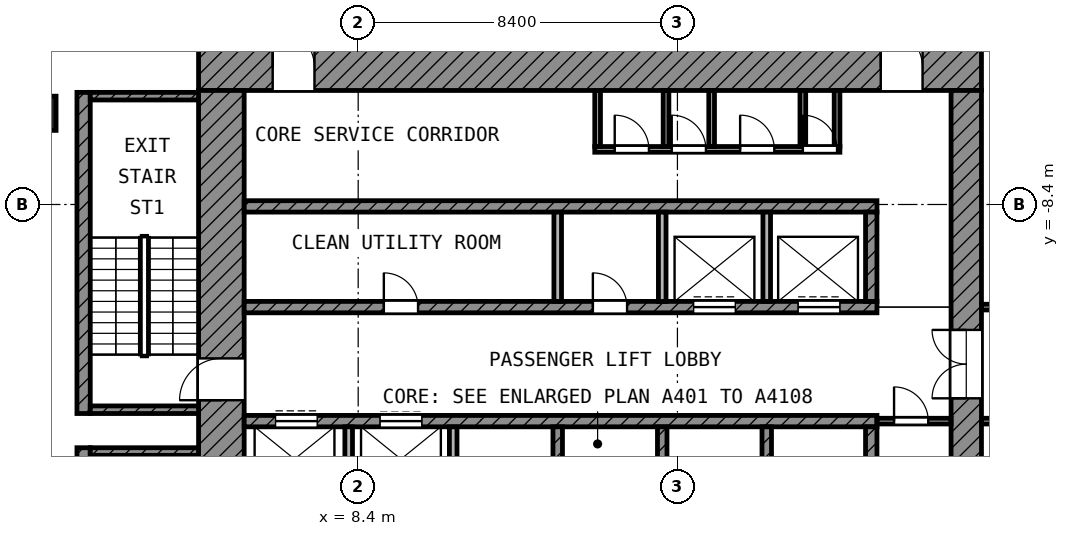
"""IFC4 building model, lengths in metres.
Left out: names, types, materials, properties, quantities, classifications, styles, units other than length and angle.
Written with IfcOpenShell. Run it as: python <this file> out.ifc"""

import sys

from ifc_helpers import new_model, si_unit, direction, frame, frame_2d, origin, origin_2d, place, context, subcontext, project, spatial, rectangle, extrude, element, fill, save


model = new_model("IFC4")
c1 = context("Model", 3, precision=1e-05, world=origin(), true_north=direction((0.0, 1.0)))
c2 = subcontext(c1, "Body", "Model", "MODEL_VIEW")
j1 = project(units=[si_unit("LENGTHUNIT", "METRE"), si_unit("PLANEANGLEUNIT", "RADIAN")], contexts=[c1])
p1 = place(None, origin())
s1 = spatial("IfcSite", under=j1, at=p1, CompositionType="ELEMENT")
p2 = place(p1, origin())
s2 = spatial("IfcBuilding", under=s1, at=p2, CompositionType="ELEMENT")
p3 = place(p2, frame((0.0, 0.0, 255.8)))
s3 = spatial("IfcBuildingStorey", under=s2, at=p3, CompositionType="ELEMENT", Elevation=255.8)
p4 = place(p3, frame((0.0, -6.0, 0.0), z_axis=(0.0, 0.0, 1.0), x_axis=(1.0, 0.0, 0.0)))
e1 = element("IfcColumn", 1, at=p4, inside=s3, PredefinedType="COLUMN", context=c2, shape_type="SweptSolid", body=[
    extrude(rectangle(XDim=0.9, YDim=0.9, at=origin_2d()), origin(), (0.0, 0.0, 1.0), 4.2),
])
p5 = place(p3, frame((4.2, -4.8, 0.0), z_axis=(0.0, 0.0, 1.0), x_axis=(1.0, 0.0, 0.0)))
e2 = element("IfcWall", 2, at=p5, inside=s3, PredefinedType="SHEAR", context=c2, shape_type="SweptSolid", body=[
    extrude(rectangle(XDim=20.6, YDim=1.2, at=frame_2d((10.3, 0.0))), origin(), (0.0, 0.0, 1.0), 3.6),
])
p6 = place(p5, frame((1.95, 0.0, 0.0)))
e3 = element("IfcOpeningElement", 3, at=p6, cuts=e2, PredefinedType="OPENING", context=c2, shape_type="SweptSolid", body=[
    extrude(rectangle(XDim=1.1, YDim=2.1, at=frame_2d((0.55, 1.05))), frame((0.0, 0.61, 0.0), z_axis=(0.0, -1.0, 0.0), x_axis=(1.0, 0.0, 0.0)), (0.0, 0.0, 1.0), 1.22),
])
p7 = place(p5, frame((17.95, 0.0, 0.0)))
e4 = element("IfcOpeningElement", 4, at=p7, cuts=e2, PredefinedType="OPENING", context=c2, shape_type="SweptSolid", body=[
    extrude(rectangle(XDim=1.1, YDim=2.1, at=frame_2d((0.55, 1.05))), frame((0.0, 0.61, 0.0), z_axis=(0.0, -1.0, 0.0), x_axis=(1.0, 0.0, 0.0)), (0.0, 0.0, 1.0), 1.22),
])
p8 = place(p3, frame((4.8, -24.8, 0.0), z_axis=(0.0, 0.0, 1.0), x_axis=(0.0, 1.0, 0.0)))
e5 = element("IfcWall", 5, at=p8, inside=s3, PredefinedType="SHEAR", context=c2, shape_type="SweptSolid", body=[
    extrude(rectangle(XDim=19.4, YDim=1.2, at=frame_2d((9.7, 0.0))), origin(), (0.0, 0.0, 1.0), 3.6),
])
p9 = place(p8, frame((11.25, 0.0, 0.0)))
e6 = element("IfcOpeningElement", 6, at=p9, cuts=e5, PredefinedType="OPENING", context=c2, shape_type="SweptSolid", body=[
    extrude(rectangle(XDim=1.1, YDim=2.1, at=frame_2d((0.55, 1.05))), frame((0.0, 0.61, 0.0), z_axis=(0.0, -1.0, 0.0), x_axis=(1.0, 0.0, 0.0)), (0.0, 0.0, 1.0), 1.22),
])
p10 = place(p8, frame((1.95, 0.0, 0.0)))
e7 = element("IfcOpeningElement", 7, at=p10, cuts=e5, PredefinedType="OPENING", context=c2, shape_type="SweptSolid", body=[
    extrude(rectangle(XDim=1.1, YDim=2.1, at=frame_2d((0.55, 1.05))), frame((0.0, 0.61, 0.0), z_axis=(0.0, -1.0, 0.0), x_axis=(1.0, 0.0, 0.0)), (0.0, 0.0, 1.0), 1.22),
])
p11 = place(p3, frame((24.4, -24.0, 0.0), z_axis=(0.0, 0.0, 1.0), x_axis=(0.0, 1.0, 0.0)))
e8 = element("IfcWall", 8, at=p11, inside=s3, PredefinedType="SHEAR", context=c2, shape_type="SweptSolid", body=[
    extrude(rectangle(XDim=18.6, YDim=0.8, at=frame_2d((9.3, 0.0))), origin(), (0.0, 0.0, 1.0), 3.6),
])
p12 = place(p11, frame((10.5, 0.0, 0.0)))
e9 = element("IfcOpeningElement", 9, at=p12, cuts=e8, PredefinedType="OPENING", context=c2, shape_type="SweptSolid", body=[
    extrude(rectangle(XDim=1.8, YDim=2.1, at=frame_2d((0.9, 1.05))), frame((0.0, 0.41, 0.0), z_axis=(0.0, -1.0, 0.0), x_axis=(1.0, 0.0, 0.0)), (0.0, 0.0, 1.0), 0.82),
])
p13 = place(p3, frame((5.4, -8.45, 0.0), z_axis=(0.0, 0.0, 1.0), x_axis=(1.0, 0.0, 0.0)))
e10 = element("IfcWall", 10, at=p13, inside=s3, PredefinedType="SHEAR", context=c2, shape_type="SweptSolid", body=[
    extrude(rectangle(XDim=16.65, YDim=0.3, at=frame_2d((8.325, 0.0))), origin(), (0.0, 0.0, 1.0), 3.6),
])
p14 = place(p3, frame((5.4, -11.1, 0.0), z_axis=(0.0, 0.0, 1.0), x_axis=(1.0, 0.0, 0.0)))
e11 = element("IfcWall", 11, at=p14, inside=s3, PredefinedType="SHEAR", context=c2, shape_type="SweptSolid", body=[
    extrude(rectangle(XDim=16.65, YDim=0.3, at=frame_2d((8.325, 0.0))), origin(), (0.0, 0.0, 1.0), 3.6),
])
p15 = place(p14, frame((11.825, 0.0, 0.0)))
e12 = element("IfcOpeningElement", 12, at=p15, cuts=e11, PredefinedType="OPENING", context=c2, shape_type="SweptSolid", body=[
    extrude(rectangle(XDim=1.1, YDim=2.1, at=frame_2d((0.55, 1.05))), frame((0.0, 0.16, 0.0), z_axis=(0.0, -1.0, 0.0), x_axis=(1.0, 0.0, 0.0)), (0.0, 0.0, 1.0), 0.32),
])
p16 = place(p14, frame((14.575, 0.0, 0.0)))
e13 = element("IfcOpeningElement", 13, at=p16, cuts=e11, PredefinedType="OPENING", context=c2, shape_type="SweptSolid", body=[
    extrude(rectangle(XDim=1.1, YDim=2.1, at=frame_2d((0.55, 1.05))), frame((0.0, 0.16, 0.0), z_axis=(0.0, -1.0, 0.0), x_axis=(1.0, 0.0, 0.0)), (0.0, 0.0, 1.0), 0.32),
])
p17 = place(p14, frame((3.675, 0.0, 0.0)))
e14 = element("IfcOpeningElement", 14, at=p17, cuts=e11, PredefinedType="OPENING", context=c2, shape_type="SweptSolid", body=[
    extrude(rectangle(XDim=0.9, YDim=2.1, at=frame_2d((0.45, 1.05))), frame((0.0, 0.16, 0.0), z_axis=(0.0, -1.0, 0.0), x_axis=(1.0, 0.0, 0.0)), (0.0, 0.0, 1.0), 0.32),
])
p18 = place(p14, frame((9.175, 0.0, 0.0)))
e15 = element("IfcOpeningElement", 15, at=p18, cuts=e11, PredefinedType="OPENING", context=c2, shape_type="SweptSolid", body=[
    extrude(rectangle(XDim=0.9, YDim=2.1, at=frame_2d((0.45, 1.05))), frame((0.0, 0.16, 0.0), z_axis=(0.0, -1.0, 0.0), x_axis=(1.0, 0.0, 0.0)), (0.0, 0.0, 1.0), 0.32),
])
p19 = place(p3, frame((5.4, -14.1, 0.0), z_axis=(0.0, 0.0, 1.0), x_axis=(1.0, 0.0, 0.0)))
e16 = element("IfcWall", 16, at=p19, inside=s3, PredefinedType="SHEAR", context=c2, shape_type="SweptSolid", body=[
    extrude(rectangle(XDim=16.65, YDim=0.3, at=frame_2d((8.325, 0.0))), origin(), (0.0, 0.0, 1.0), 3.6),
])
p20 = place(p19, frame((0.825, 0.0, 0.0)))
e17 = element("IfcOpeningElement", 17, at=p20, cuts=e16, PredefinedType="OPENING", context=c2, shape_type="SweptSolid", body=[
    extrude(rectangle(XDim=1.1, YDim=2.1, at=frame_2d((0.55, 1.05))), frame((0.0, 0.16, 0.0), z_axis=(0.0, -1.0, 0.0), x_axis=(1.0, 0.0, 0.0)), (0.0, 0.0, 1.0), 0.32),
])
p21 = place(p19, frame((3.575, 0.0, 0.0)))
e18 = element("IfcOpeningElement", 18, at=p21, cuts=e16, PredefinedType="OPENING", context=c2, shape_type="SweptSolid", body=[
    extrude(rectangle(XDim=1.1, YDim=2.1, at=frame_2d((0.55, 1.05))), frame((0.0, 0.16, 0.0), z_axis=(0.0, -1.0, 0.0), x_axis=(1.0, 0.0, 0.0)), (0.0, 0.0, 1.0), 0.32),
])
p22 = place(p3, frame((21.9, -10.95, 0.0), z_axis=(0.0, 0.0, 1.0), x_axis=(0.0, 1.0, 0.0)))
e19 = element("IfcWall", 19, at=p22, inside=s3, PredefinedType="SHEAR", context=c2, shape_type="SweptSolid", body=[
    extrude(rectangle(XDim=2.35, YDim=0.3, at=frame_2d((1.175, 0.0))), origin(), (0.0, 0.0, 1.0), 3.6),
])
p23 = place(p3, frame((21.9, -16.6, 0.0), z_axis=(0.0, 0.0, 1.0), x_axis=(0.0, 1.0, 0.0)))
e20 = element("IfcWall", 20, at=p23, inside=s3, PredefinedType="SHEAR", context=c2, shape_type="SweptSolid", body=[
    extrude(rectangle(XDim=2.35, YDim=0.3, at=frame_2d((1.175, 0.0))), origin(), (0.0, 0.0, 1.0), 3.6),
])
for number, where, z_axis, x_axis in (
    (21, (13.65, -10.95, 0.0), (0.0, 0.0, 1.0), (0.0, 1.0, 0.0)),
    (22, (16.4, -10.95, 0.0), (0.0, 0.0, 1.0), (0.0, 1.0, 0.0)),
    (23, (19.15, -10.95, 0.0), (0.0, 0.0, 1.0), (0.0, 1.0, 0.0)),
):
    element("IfcWall", number, at=place(p3, frame(where, z_axis=z_axis, x_axis=x_axis)), inside=s3, PredefinedType="PARTITIONING", context=c2, shape_type="SweptSolid", body=[
        extrude(rectangle(XDim=2.35, YDim=0.2, at=frame_2d((1.175, 0.0))), origin(), (0.0, 0.0, 1.0), 3.6),
    ])
for number, where, z_axis, x_axis in (
    (24, (8.15, -16.6, 0.0), (0.0, 0.0, 1.0), (0.0, 1.0, 0.0)),
    (25, (10.9, -16.6, 0.0), (0.0, 0.0, 1.0), (0.0, 1.0, 0.0)),
):
    element("IfcWall", number, at=place(p3, frame(where, z_axis=z_axis, x_axis=x_axis)), inside=s3, PredefinedType="PARTITIONING", context=c2, shape_type="SweptSolid", body=[
        extrude(rectangle(XDim=2.35, YDim=0.2, at=frame_2d((1.175, 0.0))), origin(), (0.0, 0.0, 1.0), 3.6),
    ])
for number, where, z_axis, x_axis in (
    (26, (13.65, -16.6, 0.0), (0.0, 0.0, 1.0), (0.0, 1.0, 0.0)),
    (27, (16.4, -16.6, 0.0), (0.0, 0.0, 1.0), (0.0, 1.0, 0.0)),
    (28, (19.15, -16.6, 0.0), (0.0, 0.0, 1.0), (0.0, 1.0, 0.0)),
):
    element("IfcWall", number, at=place(p3, frame(where, z_axis=z_axis, x_axis=x_axis)), inside=s3, PredefinedType="SHEAR", context=c2, shape_type="SweptSolid", body=[
        extrude(rectangle(XDim=2.35, YDim=0.25, at=frame_2d((1.175, 0.0))), origin(), (0.0, 0.0, 1.0), 3.6),
    ])
p24 = place(p3, frame((22.05, -14.1, 0.0), z_axis=(0.0, 0.0, 1.0), x_axis=(1.0, 0.0, 0.0)))
e29 = element("IfcWall", 29, at=p24, inside=s3, PredefinedType="PARTITIONING", context=c2, shape_type="SweptSolid", body=[
    extrude(rectangle(XDim=1.95, YDim=0.15, at=frame_2d((0.975, 0.0))), origin(), (0.0, 0.0, 1.0), 3.6),
])
p25 = place(p24, frame((0.45, 0.0, 0.0)))
e30 = element("IfcOpeningElement", 30, at=p25, cuts=e29, PredefinedType="OPENING", context=c2, shape_type="SweptSolid", body=[
    extrude(rectangle(XDim=0.9, YDim=2.1, at=frame_2d((0.45, 1.05))), frame((0.0, 0.085, 0.0), z_axis=(0.0, -1.0, 0.0), x_axis=(1.0, 0.0, 0.0)), (0.0, 0.0, 1.0), 0.17),
])
p26 = place(p3, frame((14.625, -6.95, 0.0), z_axis=(0.0, 0.0, 1.0), x_axis=(1.0, 0.0, 0.0)))
e31 = element("IfcWall", 31, at=p26, inside=s3, PredefinedType="PARTITIONING", context=c2, shape_type="SweptSolid", body=[
    extrude(rectangle(XDim=6.45, YDim=0.15, at=frame_2d((3.225, 0.0))), origin(), (0.0, 0.0, 1.0), 3.6),
])
p27 = place(p26, frame((0.525, 0.0, 0.0)))
e32 = element("IfcOpeningElement", 32, at=p27, cuts=e31, PredefinedType="OPENING", context=c2, shape_type="SweptSolid", body=[
    extrude(rectangle(XDim=0.9, YDim=2.1, at=frame_2d((0.45, 1.05))), frame((0.0, 0.085, 0.0), z_axis=(0.0, -1.0, 0.0), x_axis=(1.0, 0.0, 0.0)), (0.0, 0.0, 1.0), 0.17),
])
p28 = place(p26, frame((2.025, 0.0, 0.0)))
e33 = element("IfcOpeningElement", 33, at=p28, cuts=e31, PredefinedType="OPENING", context=c2, shape_type="SweptSolid", body=[
    extrude(rectangle(XDim=0.9, YDim=2.1, at=frame_2d((0.45, 1.05))), frame((0.0, 0.085, 0.0), z_axis=(0.0, -1.0, 0.0), x_axis=(1.0, 0.0, 0.0)), (0.0, 0.0, 1.0), 0.17),
])
p29 = place(p26, frame((3.825, 0.0, 0.0)))
e34 = element("IfcOpeningElement", 34, at=p29, cuts=e31, PredefinedType="OPENING", context=c2, shape_type="SweptSolid", body=[
    extrude(rectangle(XDim=0.9, YDim=2.1, at=frame_2d((0.45, 1.05))), frame((0.0, 0.085, 0.0), z_axis=(0.0, -1.0, 0.0), x_axis=(1.0, 0.0, 0.0)), (0.0, 0.0, 1.0), 0.17),
])
p30 = place(p26, frame((5.475, 0.0, 0.0)))
e35 = element("IfcOpeningElement", 35, at=p30, cuts=e31, PredefinedType="OPENING", context=c2, shape_type="SweptSolid", body=[
    extrude(rectangle(XDim=0.9, YDim=2.1, at=frame_2d((0.45, 1.05))), frame((0.0, 0.085, 0.0), z_axis=(0.0, -1.0, 0.0), x_axis=(1.0, 0.0, 0.0)), (0.0, 0.0, 1.0), 0.17),
])
for number, where, z_axis, x_axis in (
    (36, (14.7, -6.875, 0.0), (0.0, 0.0, 1.0), (0.0, 1.0, 0.0)),
    (37, (16.5, -6.875, 0.0), (0.0, 0.0, 1.0), (0.0, 1.0, 0.0)),
    (38, (17.7, -6.875, 0.0), (0.0, 0.0, 1.0), (0.0, 1.0, 0.0)),
    (39, (20.1, -6.875, 0.0), (0.0, 0.0, 1.0), (0.0, 1.0, 0.0)),
    (40, (21.0, -6.875, 0.0), (0.0, 0.0, 1.0), (0.0, 1.0, 0.0)),
):
    element("IfcWall", number, at=place(p3, frame(where, z_axis=z_axis, x_axis=x_axis)), inside=s3, PredefinedType="PARTITIONING", context=c2, shape_type="SweptSolid", body=[
        extrude(rectangle(XDim=1.475, YDim=0.15, at=frame_2d((0.738, 0.0))), origin(), (0.0, 0.0, 1.0), 3.6),
    ])
p31 = place(p3, frame((1.175, -13.9, 0.0), z_axis=(0.0, 0.0, 1.0), x_axis=(0.0, 1.0, 0.0)))
e41 = element("IfcWall", 41, at=p31, inside=s3, PredefinedType="SHEAR", context=c2, shape_type="SweptSolid", body=[
    extrude(rectangle(XDim=8.45, YDim=0.35, at=frame_2d((4.225, 0.0))), origin(), (0.0, 0.0, 1.0), 3.6),
])
for number, where, z_axis, x_axis in (
    (42, (1.35, -5.55, 0.0), (0.0, 0.0, 1.0), (1.0, 0.0, 0.0)),
    (43, (1.35, -13.8, 0.0), (0.0, 0.0, 1.0), (1.0, 0.0, 0.0)),
):
    element("IfcWall", number, at=place(p3, frame(where, z_axis=z_axis, x_axis=x_axis)), inside=s3, PredefinedType="SHEAR", context=c2, shape_type="SweptSolid", body=[
        extrude(rectangle(XDim=2.85, YDim=0.2, at=frame_2d((1.425, 0.0))), origin(), (0.0, 0.0, 1.0), 3.6),
    ])
p32 = place(p3, frame((1.175, -23.25, 0.0), z_axis=(0.0, 0.0, 1.0), x_axis=(0.0, 1.0, 0.0)))
e44 = element("IfcWall", 44, at=p32, inside=s3, PredefinedType="SHEAR", context=c2, shape_type="SweptSolid", body=[
    extrude(rectangle(XDim=8.45, YDim=0.35, at=frame_2d((4.225, 0.0))), origin(), (0.0, 0.0, 1.0), 3.6),
])
p33 = place(p3, frame((1.35, -14.9, 0.0), z_axis=(0.0, 0.0, 1.0), x_axis=(1.0, 0.0, 0.0)))
e45 = element("IfcWall", 45, at=p33, inside=s3, PredefinedType="SHEAR", context=c2, shape_type="SweptSolid", body=[
    extrude(rectangle(XDim=2.85, YDim=0.2, at=frame_2d((1.425, 0.0))), origin(), (0.0, 0.0, 1.0), 3.6),
])
p34 = place(p3, frame((24.8, -14.1, 0.0), z_axis=(0.0, 0.0, 1.0), x_axis=(1.0, 0.0, 0.0)))
e46 = element("IfcWall", 46, at=p34, inside=s3, PredefinedType="PARTITIONING", context=c2, shape_type="SweptSolid", body=[
    extrude(rectangle(XDim=4.525, YDim=0.15, at=frame_2d((2.262, 0.0))), origin(), (0.0, 0.0, 1.0), 3.6),
])
p35 = place(p34, frame((1.75, 0.0, 0.0)))
e47 = element("IfcOpeningElement", 47, at=p35, cuts=e46, PredefinedType="OPENING", context=c2, shape_type="SweptSolid", body=[
    extrude(rectangle(XDim=1.5, YDim=2.1, at=frame_2d((0.75, 1.05))), frame((0.0, 0.085, 0.0), z_axis=(0.0, -1.0, 0.0), x_axis=(1.0, 0.0, 0.0)), (0.0, 0.0, 1.0), 0.17),
])
p36 = place(p3, frame((24.8, -11.1, 0.0), z_axis=(0.0, 0.0, 1.0), x_axis=(1.0, 0.0, 0.0)))
e48 = element("IfcWall", 48, at=p36, inside=s3, PredefinedType="PARTITIONING", context=c2, shape_type="SweptSolid", body=[
    extrude(rectangle(XDim=4.525, YDim=0.15, at=frame_2d((2.262, 0.0))), origin(), (0.0, 0.0, 1.0), 3.6),
])
p37 = place(p36, frame((1.0, 0.0, 0.0)))
e49 = element("IfcOpeningElement", 49, at=p37, cuts=e48, PredefinedType="OPENING", context=c2, shape_type="SweptSolid", body=[
    extrude(rectangle(XDim=0.9, YDim=2.1, at=frame_2d((0.45, 1.05))), frame((0.0, 0.085, 0.0), z_axis=(0.0, -1.0, 0.0), x_axis=(1.0, 0.0, 0.0)), (0.0, 0.0, 1.0), 0.17),
])
p38 = place(p36, frame((3.05, 0.0, 0.0)))
e50 = element("IfcOpeningElement", 50, at=p38, cuts=e48, PredefinedType="OPENING", context=c2, shape_type="SweptSolid", body=[
    extrude(rectangle(XDim=1.0, YDim=2.1, at=frame_2d((0.5, 1.05))), frame((0.0, 0.085, 0.0), z_axis=(0.0, -1.0, 0.0), x_axis=(1.0, 0.0, 0.0)), (0.0, 0.0, 1.0), 0.17),
])
p39 = place(p15, origin())
e51 = element("IfcDoor", 51, at=p39, inside=s3, OperationType="DOUBLE_DOOR_SLIDING", PredefinedType="DOOR", context=c2, shape_type="SweptSolid", body=[
    extrude(rectangle(XDim=1.1, YDim=2.1, at=frame_2d((0.55, 1.05))), frame((0.0, 0.025, 0.0), z_axis=(0.0, -1.0, 0.0), x_axis=(1.0, 0.0, 0.0)), (0.0, 0.0, 1.0), 0.05),
])
fill(e12, e51)
p40 = place(p16, origin())
e52 = element("IfcDoor", 52, at=p40, inside=s3, OperationType="DOUBLE_DOOR_SLIDING", PredefinedType="DOOR", context=c2, shape_type="SweptSolid", body=[
    extrude(rectangle(XDim=1.1, YDim=2.1, at=frame_2d((0.55, 1.05))), frame((0.0, 0.025, 0.0), z_axis=(0.0, -1.0, 0.0), x_axis=(1.0, 0.0, 0.0)), (0.0, 0.0, 1.0), 0.05),
])
fill(e13, e52)
p41 = place(p20, origin())
e53 = element("IfcDoor", 53, at=p41, inside=s3, OperationType="DOUBLE_DOOR_SLIDING", PredefinedType="DOOR", context=c2, shape_type="SweptSolid", body=[
    extrude(rectangle(XDim=1.1, YDim=2.1, at=frame_2d((0.55, 1.05))), frame((0.0, 0.025, 0.0), z_axis=(0.0, -1.0, 0.0), x_axis=(1.0, 0.0, 0.0)), (0.0, 0.0, 1.0), 0.05),
])
fill(e17, e53)
p42 = place(p21, origin())
e54 = element("IfcDoor", 54, at=p42, inside=s3, OperationType="DOUBLE_DOOR_SLIDING", PredefinedType="DOOR", context=c2, shape_type="SweptSolid", body=[
    extrude(rectangle(XDim=1.1, YDim=2.1, at=frame_2d((0.55, 1.05))), frame((0.0, 0.025, 0.0), z_axis=(0.0, -1.0, 0.0), x_axis=(1.0, 0.0, 0.0)), (0.0, 0.0, 1.0), 0.05),
])
fill(e18, e54)
p43 = place(p9, origin())
e55 = element("IfcDoor", 55, at=p43, inside=s3, OperationType="SINGLE_SWING_LEFT", PredefinedType="DOOR", context=c2, shape_type="SweptSolid", body=[
    extrude(rectangle(XDim=1.1, YDim=2.1, at=frame_2d((0.55, 1.05))), frame((0.0, 0.025, 0.0), z_axis=(0.0, -1.0, 0.0), x_axis=(1.0, 0.0, 0.0)), (0.0, 0.0, 1.0), 0.05),
])
fill(e6, e55)
p44 = place(p6, origin())
e56 = element("IfcDoor", 56, at=p44, inside=s3, OperationType="SINGLE_SWING_LEFT", PredefinedType="DOOR", context=c2, shape_type="SweptSolid", body=[
    extrude(rectangle(XDim=1.1, YDim=2.1, at=frame_2d((0.55, 1.05))), frame((0.0, 0.025, 0.0), z_axis=(0.0, -1.0, 0.0), x_axis=(1.0, 0.0, 0.0)), (0.0, 0.0, 1.0), 0.05),
])
fill(e3, e56)
p45 = place(p7, origin())
e57 = element("IfcDoor", 57, at=p45, inside=s3, OperationType="SINGLE_SWING_LEFT", PredefinedType="DOOR", context=c2, shape_type="SweptSolid", body=[
    extrude(rectangle(XDim=1.1, YDim=2.1, at=frame_2d((0.55, 1.05))), frame((0.0, 0.025, 0.0), z_axis=(0.0, -1.0, 0.0), x_axis=(1.0, 0.0, 0.0)), (0.0, 0.0, 1.0), 0.05),
])
fill(e4, e57)
p46 = place(p12, origin())
e58 = element("IfcDoor", 58, at=p46, inside=s3, OperationType="DOUBLE_DOOR_SINGLE_SWING", PredefinedType="DOOR", context=c2, shape_type="SweptSolid", body=[
    extrude(rectangle(XDim=1.8, YDim=2.1, at=frame_2d((0.9, 1.05))), frame((0.0, 0.025, 0.0), z_axis=(0.0, -1.0, 0.0), x_axis=(1.0, 0.0, 0.0)), (0.0, 0.0, 1.0), 0.05),
])
fill(e9, e58)
p47 = place(p27, origin())
e59 = element("IfcDoor", 59, at=p47, inside=s3, OperationType="SINGLE_SWING_LEFT", PredefinedType="DOOR", context=c2, shape_type="SweptSolid", body=[
    extrude(rectangle(XDim=0.9, YDim=2.1, at=frame_2d((0.45, 1.05))), frame((0.0, 0.025, 0.0), z_axis=(0.0, -1.0, 0.0), x_axis=(1.0, 0.0, 0.0)), (0.0, 0.0, 1.0), 0.05),
])
fill(e32, e59)
p48 = place(p28, origin())
e60 = element("IfcDoor", 60, at=p48, inside=s3, OperationType="SINGLE_SWING_LEFT", PredefinedType="DOOR", context=c2, shape_type="SweptSolid", body=[
    extrude(rectangle(XDim=0.9, YDim=2.1, at=frame_2d((0.45, 1.05))), frame((0.0, 0.025, 0.0), z_axis=(0.0, -1.0, 0.0), x_axis=(1.0, 0.0, 0.0)), (0.0, 0.0, 1.0), 0.05),
])
fill(e33, e60)
p49 = place(p29, origin())
e61 = element("IfcDoor", 61, at=p49, inside=s3, OperationType="SINGLE_SWING_LEFT", PredefinedType="DOOR", context=c2, shape_type="SweptSolid", body=[
    extrude(rectangle(XDim=0.9, YDim=2.1, at=frame_2d((0.45, 1.05))), frame((0.0, 0.025, 0.0), z_axis=(0.0, -1.0, 0.0), x_axis=(1.0, 0.0, 0.0)), (0.0, 0.0, 1.0), 0.05),
])
fill(e34, e61)
p50 = place(p30, origin())
e62 = element("IfcDoor", 62, at=p50, inside=s3, OperationType="SINGLE_SWING_LEFT", PredefinedType="DOOR", context=c2, shape_type="SweptSolid", body=[
    extrude(rectangle(XDim=0.9, YDim=2.1, at=frame_2d((0.45, 1.05))), frame((0.0, 0.025, 0.0), z_axis=(0.0, -1.0, 0.0), x_axis=(1.0, 0.0, 0.0)), (0.0, 0.0, 1.0), 0.05),
])
fill(e35, e62)
p51 = place(p25, origin())
e63 = element("IfcDoor", 63, at=p51, inside=s3, OperationType="SINGLE_SWING_LEFT", PredefinedType="DOOR", context=c2, shape_type="SweptSolid", body=[
    extrude(rectangle(XDim=0.9, YDim=2.1, at=frame_2d((0.45, 1.05))), frame((0.0, 0.025, 0.0), z_axis=(0.0, -1.0, 0.0), x_axis=(1.0, 0.0, 0.0)), (0.0, 0.0, 1.0), 0.05),
])
fill(e30, e63)
p52 = place(p17, origin())
e64 = element("IfcDoor", 64, at=p52, inside=s3, OperationType="SINGLE_SWING_LEFT", PredefinedType="DOOR", context=c2, shape_type="SweptSolid", body=[
    extrude(rectangle(XDim=0.9, YDim=2.1, at=frame_2d((0.45, 1.05))), frame((0.0, 0.025, 0.0), z_axis=(0.0, -1.0, 0.0), x_axis=(1.0, 0.0, 0.0)), (0.0, 0.0, 1.0), 0.05),
])
fill(e14, e64)
p53 = place(p18, origin())
e65 = element("IfcDoor", 65, at=p53, inside=s3, OperationType="SINGLE_SWING_LEFT", PredefinedType="DOOR", context=c2, shape_type="SweptSolid", body=[
    extrude(rectangle(XDim=0.9, YDim=2.1, at=frame_2d((0.45, 1.05))), frame((0.0, 0.025, 0.0), z_axis=(0.0, -1.0, 0.0), x_axis=(1.0, 0.0, 0.0)), (0.0, 0.0, 1.0), 0.05),
])
fill(e15, e65)
save(model, sys.argv[1])
